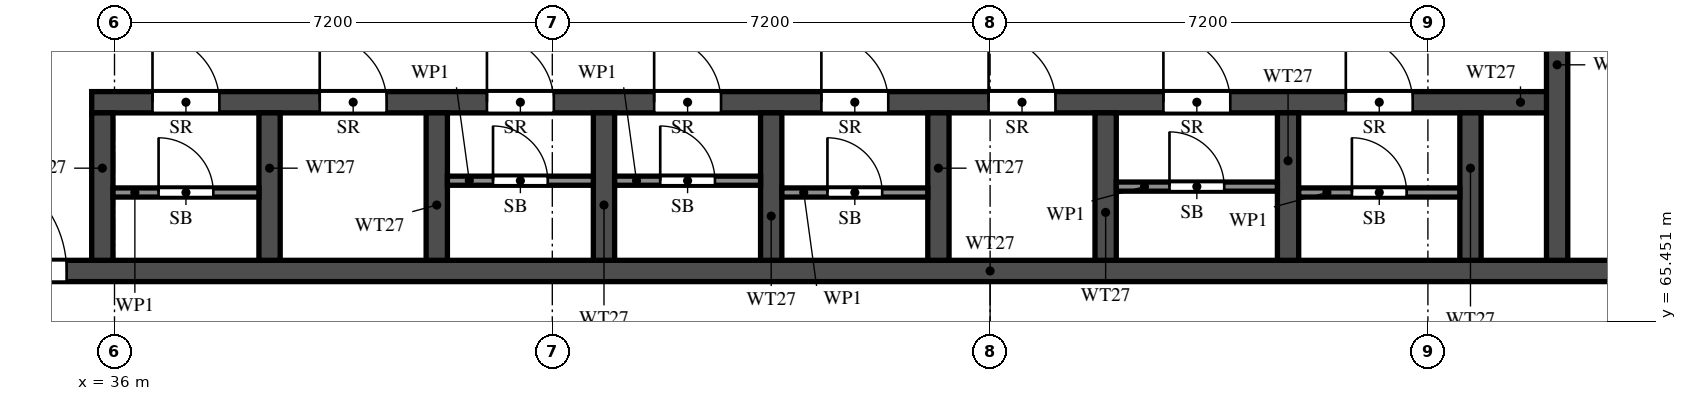
"""IFC4 building model, lengths in metres.
Left out: names, types, materials, properties, quantities, classifications, styles, units other than length and angle.
Written with IfcOpenShell. Run it as: python <this file> out.ifc"""

import sys

from ifc_helpers import new_model, si_unit, direction, frame, frame_2d, origin, place, context, subcontext, project, spatial, rectangle, extrude, element, fill, save


model = new_model("IFC4")
c1 = context("Model", 3, precision=1e-05, world=origin(), true_north=direction((0.0, 1.0)))
c2 = subcontext(c1, "Body", "Model", "MODEL_VIEW")
j1 = project(units=[si_unit("LENGTHUNIT", "METRE"), si_unit("PLANEANGLEUNIT", "RADIAN")], contexts=[c1])
p1 = place(None, origin())
s1 = spatial("IfcSite", under=j1, at=p1, CompositionType="ELEMENT")
p2 = place(p1, origin())
s2 = spatial("IfcBuilding", under=s1, at=p2, CompositionType="ELEMENT")
p3 = place(p2, frame((0.0, 0.0, 174.5)))
s3 = spatial("IfcBuildingStorey", under=s2, at=p3, CompositionType="ELEMENT", Elevation=174.5)
p4 = place(p3, frame((29.7, 66.275, 0.0), z_axis=(0.0, 0.0, 1.0), x_axis=(1.0, 0.0, 0.0)))
e1 = element("IfcWall", 1, at=p4, inside=s3, PredefinedType="SHEAR", context=c2, shape_type="SweptSolid", body=[
    extrude(rectangle(XDim=41.4, YDim=0.35, at=frame_2d((20.7, 0.0))), origin(), (0.0, 0.0, 1.0), 3.2),
])
p5 = place(p4, frame((0.925, 0.0, 0.0)))
e2 = element("IfcOpeningElement", 2, at=p5, cuts=e1, PredefinedType="OPENING", context=c2, shape_type="SweptSolid", body=[
    extrude(rectangle(XDim=1.1, YDim=2.1, at=frame_2d((0.55, 1.05))), frame((0.0, 0.185, 0.0), z_axis=(0.0, -1.0, 0.0), x_axis=(1.0, 0.0, 0.0)), (0.0, 0.0, 1.0), 0.37),
])
p6 = place(p4, frame((3.712, 0.0, 0.0)))
e3 = element("IfcOpeningElement", 3, at=p6, cuts=e1, PredefinedType="OPENING", context=c2, shape_type="SweptSolid", body=[
    extrude(rectangle(XDim=1.8, YDim=2.1, at=frame_2d((0.9, 1.05))), frame((0.0, 0.185, 0.0), z_axis=(0.0, -1.0, 0.0), x_axis=(1.0, 0.0, 0.0)), (0.0, 0.0, 1.0), 0.37),
])
p7 = place(p3, frame((35.625, 69.05, 0.0), z_axis=(0.0, 0.0, 1.0), x_axis=(1.0, 0.0, 0.0)))
e4 = element("IfcWall", 4, at=p7, inside=s3, PredefinedType="SHEAR", context=c2, shape_type="SweptSolid", body=[
    extrude(rectangle(XDim=24.1, YDim=0.35, at=frame_2d((12.05, 0.0))), origin(), (0.0, 0.0, 1.0), 3.2),
])
p8 = place(p7, frame((1.0, 0.0, 0.0)))
e5 = element("IfcOpeningElement", 5, at=p8, cuts=e4, PredefinedType="OPENING", context=c2, shape_type="SweptSolid", body=[
    extrude(rectangle(XDim=1.1, YDim=2.1, at=frame_2d((0.55, 1.05))), frame((0.0, 0.185, 0.0), z_axis=(0.0, -1.0, 0.0), x_axis=(1.0, 0.0, 0.0)), (0.0, 0.0, 1.0), 0.37),
])
p9 = place(p7, frame((3.75, 0.0, 0.0)))
e6 = element("IfcOpeningElement", 6, at=p9, cuts=e4, PredefinedType="OPENING", context=c2, shape_type="SweptSolid", body=[
    extrude(rectangle(XDim=1.1, YDim=2.1, at=frame_2d((0.55, 1.05))), frame((0.0, 0.185, 0.0), z_axis=(0.0, -1.0, 0.0), x_axis=(1.0, 0.0, 0.0)), (0.0, 0.0, 1.0), 0.37),
])
p10 = place(p7, frame((6.5, 0.0, 0.0)))
e7 = element("IfcOpeningElement", 7, at=p10, cuts=e4, PredefinedType="OPENING", context=c2, shape_type="SweptSolid", body=[
    extrude(rectangle(XDim=1.1, YDim=2.1, at=frame_2d((0.55, 1.05))), frame((0.0, 0.185, 0.0), z_axis=(0.0, -1.0, 0.0), x_axis=(1.0, 0.0, 0.0)), (0.0, 0.0, 1.0), 0.37),
])
p11 = place(p7, frame((9.25, 0.0, 0.0)))
e8 = element("IfcOpeningElement", 8, at=p11, cuts=e4, PredefinedType="OPENING", context=c2, shape_type="SweptSolid", body=[
    extrude(rectangle(XDim=1.1, YDim=2.1, at=frame_2d((0.55, 1.05))), frame((0.0, 0.185, 0.0), z_axis=(0.0, -1.0, 0.0), x_axis=(1.0, 0.0, 0.0)), (0.0, 0.0, 1.0), 0.37),
])
p12 = place(p7, frame((12.0, 0.0, 0.0)))
e9 = element("IfcOpeningElement", 9, at=p12, cuts=e4, PredefinedType="OPENING", context=c2, shape_type="SweptSolid", body=[
    extrude(rectangle(XDim=1.1, YDim=2.1, at=frame_2d((0.55, 1.05))), frame((0.0, 0.185, 0.0), z_axis=(0.0, -1.0, 0.0), x_axis=(1.0, 0.0, 0.0)), (0.0, 0.0, 1.0), 0.37),
])
p13 = place(p7, frame((14.75, 0.0, 0.0)))
e10 = element("IfcOpeningElement", 10, at=p13, cuts=e4, PredefinedType="OPENING", context=c2, shape_type="SweptSolid", body=[
    extrude(rectangle(XDim=1.1, YDim=2.1, at=frame_2d((0.55, 1.05))), frame((0.0, 0.185, 0.0), z_axis=(0.0, -1.0, 0.0), x_axis=(1.0, 0.0, 0.0)), (0.0, 0.0, 1.0), 0.37),
])
p14 = place(p7, frame((17.625, 0.0, 0.0)))
e11 = element("IfcOpeningElement", 11, at=p14, cuts=e4, PredefinedType="OPENING", context=c2, shape_type="SweptSolid", body=[
    extrude(rectangle(XDim=1.1, YDim=2.1, at=frame_2d((0.55, 1.05))), frame((0.0, 0.185, 0.0), z_axis=(0.0, -1.0, 0.0), x_axis=(1.0, 0.0, 0.0)), (0.0, 0.0, 1.0), 0.37),
])
p15 = place(p7, frame((20.625, 0.0, 0.0)))
e12 = element("IfcOpeningElement", 12, at=p15, cuts=e4, PredefinedType="OPENING", context=c2, shape_type="SweptSolid", body=[
    extrude(rectangle(XDim=1.1, YDim=2.1, at=frame_2d((0.55, 1.05))), frame((0.0, 0.185, 0.0), z_axis=(0.0, -1.0, 0.0), x_axis=(1.0, 0.0, 0.0)), (0.0, 0.0, 1.0), 0.37),
])
p16 = place(p3, frame((59.725, 66.45, 0.0), z_axis=(0.0, 0.0, 1.0), x_axis=(0.0, 1.0, 0.0)))
e13 = element("IfcWall", 13, at=p16, inside=s3, PredefinedType="SHEAR", context=c2, shape_type="SweptSolid", body=[
    extrude(rectangle(XDim=6.125, YDim=0.35, at=frame_2d((3.062, 0.0))), origin(), (0.0, 0.0, 1.0), 3.2),
])
p17 = place(p16, frame((3.85, 0.0, 0.0)))
e14 = element("IfcOpeningElement", 14, at=p17, cuts=e13, PredefinedType="OPENING", context=c2, shape_type="SweptSolid", body=[
    extrude(rectangle(XDim=1.2, YDim=2.1, at=frame_2d((0.6, 1.05))), frame((0.0, 0.185, 0.0), z_axis=(0.0, -1.0, 0.0), x_axis=(1.0, 0.0, 0.0)), (0.0, 0.0, 1.0), 0.37),
])
for number, where, z_axis, x_axis in (
    (15, (35.8, 66.45, 0.0), (0.0, 0.0, 1.0), (0.0, 1.0, 0.0)),
    (16, (38.55, 66.45, 0.0), (0.0, 0.0, 1.0), (0.0, 1.0, 0.0)),
    (17, (41.3, 66.45, 0.0), (0.0, 0.0, 1.0), (0.0, 1.0, 0.0)),
    (18, (44.05, 66.45, 0.0), (0.0, 0.0, 1.0), (0.0, 1.0, 0.0)),
    (19, (46.8, 66.45, 0.0), (0.0, 0.0, 1.0), (0.0, 1.0, 0.0)),
    (20, (49.55, 66.45, 0.0), (0.0, 0.0, 1.0), (0.0, 1.0, 0.0)),
    (21, (52.3, 66.45, 0.0), (0.0, 0.0, 1.0), (0.0, 1.0, 0.0)),
    (22, (55.3, 66.45, 0.0), (0.0, 0.0, 1.0), (0.0, 1.0, 0.0)),
    (23, (58.3, 66.45, 0.0), (0.0, 0.0, 1.0), (0.0, 1.0, 0.0)),
):
    element("IfcWall", number, at=place(p3, frame(where, z_axis=z_axis, x_axis=x_axis)), inside=s3, PredefinedType="SHEAR", context=c2, shape_type="SweptSolid", body=[
        extrude(rectangle(XDim=2.425, YDim=0.35, at=frame_2d((1.212, 0.0))), origin(), (0.0, 0.0, 1.0), 3.2),
    ])
p18 = place(p3, frame((35.975, 67.565, 0.0), z_axis=(0.0, 0.0, 1.0), x_axis=(1.0, 0.0, 0.0)))
e24 = element("IfcWall", 24, at=p18, inside=s3, PredefinedType="PARTITIONING", context=c2, shape_type="SweptSolid", body=[
    extrude(rectangle(XDim=2.4, YDim=0.15, at=frame_2d((1.2, 0.0))), origin(), (0.0, 0.0, 1.0), 3.2),
])
p19 = place(p18, frame((0.75, 0.0, 0.0)))
e25 = element("IfcOpeningElement", 25, at=p19, cuts=e24, PredefinedType="OPENING", context=c2, shape_type="SweptSolid", body=[
    extrude(rectangle(XDim=0.9, YDim=2.1, at=frame_2d((0.45, 1.05))), frame((0.0, 0.085, 0.0), z_axis=(0.0, -1.0, 0.0), x_axis=(1.0, 0.0, 0.0)), (0.0, 0.0, 1.0), 0.17),
])
p20 = place(p3, frame((41.475, 67.76, 0.0), z_axis=(0.0, 0.0, 1.0), x_axis=(1.0, 0.0, 0.0)))
e26 = element("IfcWall", 26, at=p20, inside=s3, PredefinedType="PARTITIONING", context=c2, shape_type="SweptSolid", body=[
    extrude(rectangle(XDim=2.4, YDim=0.15, at=frame_2d((1.2, 0.0))), origin(), (0.0, 0.0, 1.0), 3.2),
])
p21 = place(p20, frame((0.75, 0.0, 0.0)))
e27 = element("IfcOpeningElement", 27, at=p21, cuts=e26, PredefinedType="OPENING", context=c2, shape_type="SweptSolid", body=[
    extrude(rectangle(XDim=0.9, YDim=2.1, at=frame_2d((0.45, 1.05))), frame((0.0, 0.085, 0.0), z_axis=(0.0, -1.0, 0.0), x_axis=(1.0, 0.0, 0.0)), (0.0, 0.0, 1.0), 0.17),
])
p22 = place(p3, frame((44.225, 67.76, 0.0), z_axis=(0.0, 0.0, 1.0), x_axis=(1.0, 0.0, 0.0)))
e28 = element("IfcWall", 28, at=p22, inside=s3, PredefinedType="PARTITIONING", context=c2, shape_type="SweptSolid", body=[
    extrude(rectangle(XDim=2.4, YDim=0.15, at=frame_2d((1.2, 0.0))), origin(), (0.0, 0.0, 1.0), 3.2),
])
p23 = place(p22, frame((0.75, 0.0, 0.0)))
e29 = element("IfcOpeningElement", 29, at=p23, cuts=e28, PredefinedType="OPENING", context=c2, shape_type="SweptSolid", body=[
    extrude(rectangle(XDim=0.9, YDim=2.1, at=frame_2d((0.45, 1.05))), frame((0.0, 0.085, 0.0), z_axis=(0.0, -1.0, 0.0), x_axis=(1.0, 0.0, 0.0)), (0.0, 0.0, 1.0), 0.17),
])
p24 = place(p3, frame((46.975, 67.565, 0.0), z_axis=(0.0, 0.0, 1.0), x_axis=(1.0, 0.0, 0.0)))
e30 = element("IfcWall", 30, at=p24, inside=s3, PredefinedType="PARTITIONING", context=c2, shape_type="SweptSolid", body=[
    extrude(rectangle(XDim=2.4, YDim=0.15, at=frame_2d((1.2, 0.0))), origin(), (0.0, 0.0, 1.0), 3.2),
])
p25 = place(p24, frame((0.75, 0.0, 0.0)))
e31 = element("IfcOpeningElement", 31, at=p25, cuts=e30, PredefinedType="OPENING", context=c2, shape_type="SweptSolid", body=[
    extrude(rectangle(XDim=0.9, YDim=2.1, at=frame_2d((0.45, 1.05))), frame((0.0, 0.085, 0.0), z_axis=(0.0, -1.0, 0.0), x_axis=(1.0, 0.0, 0.0)), (0.0, 0.0, 1.0), 0.17),
])
p26 = place(p3, frame((52.475, 67.663, 0.0), z_axis=(0.0, 0.0, 1.0), x_axis=(1.0, 0.0, 0.0)))
e32 = element("IfcWall", 32, at=p26, inside=s3, PredefinedType="PARTITIONING", context=c2, shape_type="SweptSolid", body=[
    extrude(rectangle(XDim=2.65, YDim=0.15, at=frame_2d((1.325, 0.0))), origin(), (0.0, 0.0, 1.0), 3.2),
])
p27 = place(p26, frame((0.875, 0.0, 0.0)))
e33 = element("IfcOpeningElement", 33, at=p27, cuts=e32, PredefinedType="OPENING", context=c2, shape_type="SweptSolid", body=[
    extrude(rectangle(XDim=0.9, YDim=2.1, at=frame_2d((0.45, 1.05))), frame((0.0, 0.085, 0.0), z_axis=(0.0, -1.0, 0.0), x_axis=(1.0, 0.0, 0.0)), (0.0, 0.0, 1.0), 0.17),
])
p28 = place(p3, frame((55.475, 67.565, 0.0), z_axis=(0.0, 0.0, 1.0), x_axis=(1.0, 0.0, 0.0)))
e34 = element("IfcWall", 34, at=p28, inside=s3, PredefinedType="PARTITIONING", context=c2, shape_type="SweptSolid", body=[
    extrude(rectangle(XDim=2.65, YDim=0.15, at=frame_2d((1.325, 0.0))), origin(), (0.0, 0.0, 1.0), 3.2),
])
p29 = place(p28, frame((0.875, 0.0, 0.0)))
e35 = element("IfcOpeningElement", 35, at=p29, cuts=e34, PredefinedType="OPENING", context=c2, shape_type="SweptSolid", body=[
    extrude(rectangle(XDim=0.9, YDim=2.1, at=frame_2d((0.45, 1.05))), frame((0.0, 0.085, 0.0), z_axis=(0.0, -1.0, 0.0), x_axis=(1.0, 0.0, 0.0)), (0.0, 0.0, 1.0), 0.17),
])
p30 = place(p6, origin())
e36 = element("IfcDoor", 36, at=p30, inside=s3, OperationType="DOUBLE_DOOR_SINGLE_SWING", PredefinedType="DOOR", context=c2, shape_type="SweptSolid", body=[
    extrude(rectangle(XDim=1.8, YDim=2.1, at=frame_2d((0.9, 1.05))), frame((0.0, 0.025, 0.0), z_axis=(0.0, -1.0, 0.0), x_axis=(1.0, 0.0, 0.0)), (0.0, 0.0, 1.0), 0.05),
])
fill(e3, e36)
p31 = place(p8, origin())
e37 = element("IfcDoor", 37, at=p31, inside=s3, OperationType="SINGLE_SWING_RIGHT", PredefinedType="DOOR", context=c2, shape_type="SweptSolid", body=[
    extrude(rectangle(XDim=1.1, YDim=2.1, at=frame_2d((0.55, 1.05))), frame((0.0, 0.025, 0.0), z_axis=(0.0, -1.0, 0.0), x_axis=(1.0, 0.0, 0.0)), (0.0, 0.0, 1.0), 0.05),
])
fill(e5, e37)
p32 = place(p19, origin())
e38 = element("IfcDoor", 38, at=p32, inside=s3, OperationType="SINGLE_SWING_RIGHT", PredefinedType="DOOR", context=c2, shape_type="SweptSolid", body=[
    extrude(rectangle(XDim=0.9, YDim=2.1, at=frame_2d((0.45, 1.05))), frame((0.0, 0.025, 0.0), z_axis=(0.0, -1.0, 0.0), x_axis=(1.0, 0.0, 0.0)), (0.0, 0.0, 1.0), 0.05),
])
fill(e25, e38)
p33 = place(p9, origin())
e39 = element("IfcDoor", 39, at=p33, inside=s3, OperationType="SINGLE_SWING_LEFT", PredefinedType="DOOR", context=c2, shape_type="SweptSolid", body=[
    extrude(rectangle(XDim=1.1, YDim=2.1, at=frame_2d((0.55, 1.05))), frame((0.0, 0.025, 0.0), z_axis=(0.0, -1.0, 0.0), x_axis=(1.0, 0.0, 0.0)), (0.0, 0.0, 1.0), 0.05),
])
fill(e6, e39)
p34 = place(p10, origin())
e40 = element("IfcDoor", 40, at=p34, inside=s3, OperationType="SINGLE_SWING_RIGHT", PredefinedType="DOOR", context=c2, shape_type="SweptSolid", body=[
    extrude(rectangle(XDim=1.1, YDim=2.1, at=frame_2d((0.55, 1.05))), frame((0.0, 0.025, 0.0), z_axis=(0.0, -1.0, 0.0), x_axis=(1.0, 0.0, 0.0)), (0.0, 0.0, 1.0), 0.05),
])
fill(e7, e40)
p35 = place(p21, origin())
e41 = element("IfcDoor", 41, at=p35, inside=s3, OperationType="SINGLE_SWING_LEFT", PredefinedType="DOOR", context=c2, shape_type="SweptSolid", body=[
    extrude(rectangle(XDim=0.9, YDim=2.1, at=frame_2d((0.45, 1.05))), frame((0.0, 0.025, 0.0), z_axis=(0.0, -1.0, 0.0), x_axis=(1.0, 0.0, 0.0)), (0.0, 0.0, 1.0), 0.05),
])
fill(e27, e41)
p36 = place(p11, origin())
e42 = element("IfcDoor", 42, at=p36, inside=s3, OperationType="SINGLE_SWING_LEFT", PredefinedType="DOOR", context=c2, shape_type="SweptSolid", body=[
    extrude(rectangle(XDim=1.1, YDim=2.1, at=frame_2d((0.55, 1.05))), frame((0.0, 0.025, 0.0), z_axis=(0.0, -1.0, 0.0), x_axis=(1.0, 0.0, 0.0)), (0.0, 0.0, 1.0), 0.05),
])
fill(e8, e42)
p37 = place(p23, origin())
e43 = element("IfcDoor", 43, at=p37, inside=s3, OperationType="SINGLE_SWING_RIGHT", PredefinedType="DOOR", context=c2, shape_type="SweptSolid", body=[
    extrude(rectangle(XDim=0.9, YDim=2.1, at=frame_2d((0.45, 1.05))), frame((0.0, 0.025, 0.0), z_axis=(0.0, -1.0, 0.0), x_axis=(1.0, 0.0, 0.0)), (0.0, 0.0, 1.0), 0.05),
])
fill(e29, e43)
p38 = place(p12, origin())
e44 = element("IfcDoor", 44, at=p38, inside=s3, OperationType="SINGLE_SWING_RIGHT", PredefinedType="DOOR", context=c2, shape_type="SweptSolid", body=[
    extrude(rectangle(XDim=1.1, YDim=2.1, at=frame_2d((0.55, 1.05))), frame((0.0, 0.025, 0.0), z_axis=(0.0, -1.0, 0.0), x_axis=(1.0, 0.0, 0.0)), (0.0, 0.0, 1.0), 0.05),
])
fill(e9, e44)
p39 = place(p25, origin())
e45 = element("IfcDoor", 45, at=p39, inside=s3, OperationType="SINGLE_SWING_RIGHT", PredefinedType="DOOR", context=c2, shape_type="SweptSolid", body=[
    extrude(rectangle(XDim=0.9, YDim=2.1, at=frame_2d((0.45, 1.05))), frame((0.0, 0.025, 0.0), z_axis=(0.0, -1.0, 0.0), x_axis=(1.0, 0.0, 0.0)), (0.0, 0.0, 1.0), 0.05),
])
fill(e31, e45)
p40 = place(p13, origin())
e46 = element("IfcDoor", 46, at=p40, inside=s3, OperationType="SINGLE_SWING_LEFT", PredefinedType="DOOR", context=c2, shape_type="SweptSolid", body=[
    extrude(rectangle(XDim=1.1, YDim=2.1, at=frame_2d((0.55, 1.05))), frame((0.0, 0.025, 0.0), z_axis=(0.0, -1.0, 0.0), x_axis=(1.0, 0.0, 0.0)), (0.0, 0.0, 1.0), 0.05),
])
fill(e10, e46)
p41 = place(p14, origin())
e47 = element("IfcDoor", 47, at=p41, inside=s3, OperationType="SINGLE_SWING_RIGHT", PredefinedType="DOOR", context=c2, shape_type="SweptSolid", body=[
    extrude(rectangle(XDim=1.1, YDim=2.1, at=frame_2d((0.55, 1.05))), frame((0.0, 0.025, 0.0), z_axis=(0.0, -1.0, 0.0), x_axis=(1.0, 0.0, 0.0)), (0.0, 0.0, 1.0), 0.05),
])
fill(e11, e47)
p42 = place(p27, origin())
e48 = element("IfcDoor", 48, at=p42, inside=s3, OperationType="SINGLE_SWING_LEFT", PredefinedType="DOOR", context=c2, shape_type="SweptSolid", body=[
    extrude(rectangle(XDim=0.9, YDim=2.1, at=frame_2d((0.45, 1.05))), frame((0.0, 0.025, 0.0), z_axis=(0.0, -1.0, 0.0), x_axis=(1.0, 0.0, 0.0)), (0.0, 0.0, 1.0), 0.05),
])
fill(e33, e48)
p43 = place(p15, origin())
e49 = element("IfcDoor", 49, at=p43, inside=s3, OperationType="SINGLE_SWING_RIGHT", PredefinedType="DOOR", context=c2, shape_type="SweptSolid", body=[
    extrude(rectangle(XDim=1.1, YDim=2.1, at=frame_2d((0.55, 1.05))), frame((0.0, 0.025, 0.0), z_axis=(0.0, -1.0, 0.0), x_axis=(1.0, 0.0, 0.0)), (0.0, 0.0, 1.0), 0.05),
])
fill(e12, e49)
p44 = place(p29, origin())
e50 = element("IfcDoor", 50, at=p44, inside=s3, OperationType="SINGLE_SWING_RIGHT", PredefinedType="DOOR", context=c2, shape_type="SweptSolid", body=[
    extrude(rectangle(XDim=0.9, YDim=2.1, at=frame_2d((0.45, 1.05))), frame((0.0, 0.025, 0.0), z_axis=(0.0, -1.0, 0.0), x_axis=(1.0, 0.0, 0.0)), (0.0, 0.0, 1.0), 0.05),
])
fill(e35, e50)
save(model, sys.argv[1])
